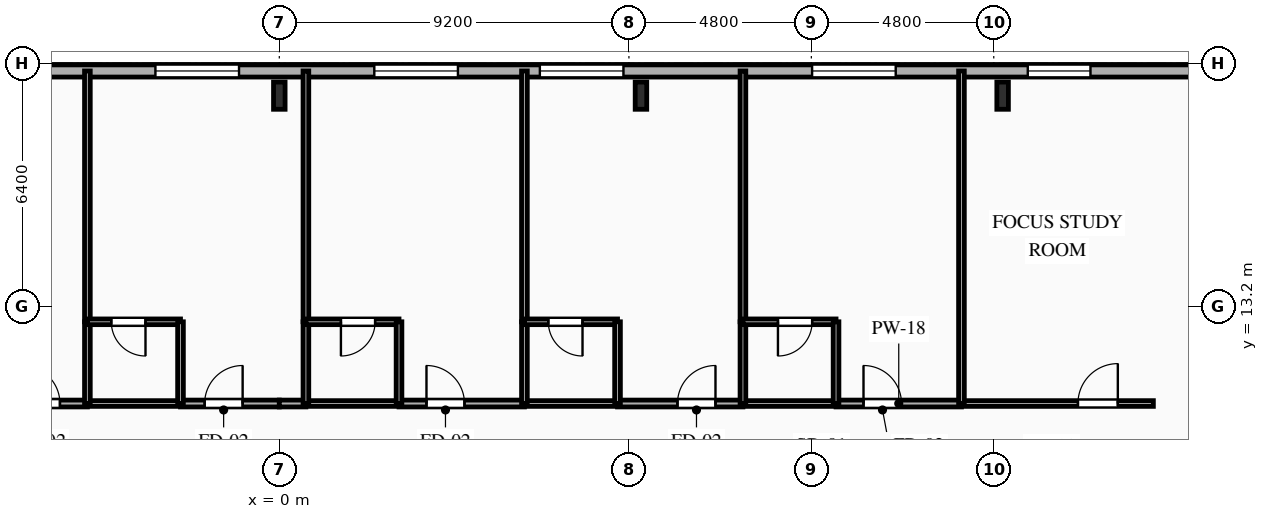
"""IFC4 building model, lengths in metres.
Left out: names, types, materials, properties, quantities, classifications, styles, units other than length and angle.
Written with IfcOpenShell. Run it as: python <this file> out.ifc"""

import sys

from ifc_helpers import new_model, si_unit, direction, frame, frame_2d, origin, origin_2d, place, context, subcontext, project, spatial, rectangle, i_section, extrude, element, fill, save


model = new_model("IFC4")
c1 = context("Model", 3, precision=1e-05, world=origin(), true_north=direction((0.0, 1.0)))
c2 = subcontext(c1, "Body", "Model", "MODEL_VIEW")
j1 = project(units=[si_unit("LENGTHUNIT", "METRE"), si_unit("PLANEANGLEUNIT", "RADIAN")], contexts=[c1])
p1 = place(None, origin())
s1 = spatial("IfcSite", under=j1, at=p1, CompositionType="ELEMENT")
p2 = place(p1, origin())
s2 = spatial("IfcBuilding", under=s1, at=p2, CompositionType="ELEMENT")
p3 = place(p2, frame((0.0, 0.0, 53.8)))
s3 = spatial("IfcBuildingStorey", under=s2, at=p3, CompositionType="ELEMENT", Elevation=53.8)
for number, where, z_axis, x_axis in (
    (1, (19.033, 18.75, 0.0), (0.0, 0.0, 1.0), (1.0, 0.0, 0.0)),
    (2, (9.517, 18.75, 0.0), (0.0, 0.0, 1.0), (1.0, 0.0, 0.0)),
    (3, (0.0, 18.75, 0.0), (0.0, 0.0, 1.0), (1.0, 0.0, 0.0)),
):
    element("IfcColumn", number, at=place(p3, frame(where, z_axis=z_axis, x_axis=x_axis)), inside=s3, PredefinedType="COLUMN", context=c2, shape_type="SweptSolid", body=[
        extrude(i_section(OverallWidth=0.304, OverallDepth=0.716, WebThickness=0.021, FlangeThickness=0.04, FilletRadius=0.027, at=origin_2d()), origin(), (0.0, 0.0, 1.0), 3.35),
    ])
p4 = place(p3, frame((-29.2, 19.4, 0.0), z_axis=(0.0, 0.0, 1.0), x_axis=(1.0, 0.0, 0.0)))
e4 = element("IfcWall", 4, at=p4, inside=s3, PredefinedType="SOLIDWALL", context=c2, shape_type="SweptSolid", body=[
    extrude(rectangle(XDim=58.4, YDim=0.32, at=frame_2d((29.2, 0.0))), origin(), (0.0, 0.0, 1.0), 3.035),
])
p5 = place(p4, frame((8.065, 0.0, 0.85)))
e5 = element("IfcOpeningElement", 5, at=p5, cuts=e4, PredefinedType="OPENING", context=c2, shape_type="SweptSolid", body=[
    extrude(rectangle(XDim=1.65, YDim=1.85, at=frame_2d((0.825, 0.925))), frame((0.0, 0.17, 0.0), z_axis=(0.0, -1.0, 0.0), x_axis=(1.0, 0.0, 0.0)), (0.0, 0.0, 1.0), 0.34),
])
p6 = place(p4, frame((15.97, 0.0, 0.85)))
e6 = element("IfcOpeningElement", 6, at=p6, cuts=e4, PredefinedType="OPENING", context=c2, shape_type="SweptSolid", body=[
    extrude(rectangle(XDim=1.5, YDim=1.85, at=frame_2d((0.75, 0.925))), frame((0.0, 0.17, 0.0), z_axis=(0.0, -1.0, 0.0), x_axis=(1.0, 0.0, 0.0)), (0.0, 0.0, 1.0), 0.34),
])
p7 = place(p4, frame((20.18, 0.0, 0.85)))
e7 = element("IfcOpeningElement", 7, at=p7, cuts=e4, PredefinedType="OPENING", context=c2, shape_type="SweptSolid", body=[
    extrude(rectangle(XDim=2.2, YDim=1.85, at=frame_2d((1.1, 0.925))), frame((0.0, 0.17, 0.0), z_axis=(0.0, -1.0, 0.0), x_axis=(1.0, 0.0, 0.0)), (0.0, 0.0, 1.0), 0.34),
])
p8 = place(p4, frame((25.94, 0.0, 0.85)))
e8 = element("IfcOpeningElement", 8, at=p8, cuts=e4, PredefinedType="OPENING", context=c2, shape_type="SweptSolid", body=[
    extrude(rectangle(XDim=2.2, YDim=1.85, at=frame_2d((1.1, 0.925))), frame((0.0, 0.17, 0.0), z_axis=(0.0, -1.0, 0.0), x_axis=(1.0, 0.0, 0.0)), (0.0, 0.0, 1.0), 0.34),
])
p9 = place(p4, frame((31.7, 0.0, 0.85)))
e9 = element("IfcOpeningElement", 9, at=p9, cuts=e4, PredefinedType="OPENING", context=c2, shape_type="SweptSolid", body=[
    extrude(rectangle(XDim=2.2, YDim=1.85, at=frame_2d((1.1, 0.925))), frame((0.0, 0.17, 0.0), z_axis=(0.0, -1.0, 0.0), x_axis=(1.0, 0.0, 0.0)), (0.0, 0.0, 1.0), 0.34),
])
p10 = place(p4, frame((36.056, 0.0, 0.85)))
e10 = element("IfcOpeningElement", 10, at=p10, cuts=e4, PredefinedType="OPENING", context=c2, shape_type="SweptSolid", body=[
    extrude(rectangle(XDim=2.2, YDim=1.85, at=frame_2d((1.1, 0.925))), frame((0.0, 0.17, 0.0), z_axis=(0.0, -1.0, 0.0), x_axis=(1.0, 0.0, 0.0)), (0.0, 0.0, 1.0), 0.34),
])
p11 = place(p4, frame((43.22, 0.0, 0.85)))
e11 = element("IfcOpeningElement", 11, at=p11, cuts=e4, PredefinedType="OPENING", context=c2, shape_type="SweptSolid", body=[
    extrude(rectangle(XDim=2.2, YDim=1.85, at=frame_2d((1.1, 0.925))), frame((0.0, 0.17, 0.0), z_axis=(0.0, -1.0, 0.0), x_axis=(1.0, 0.0, 0.0)), (0.0, 0.0, 1.0), 0.34),
])
p12 = place(p4, frame((48.895, 0.0, 0.85)))
e12 = element("IfcOpeningElement", 12, at=p12, cuts=e4, PredefinedType="OPENING", context=c2, shape_type="SweptSolid", body=[
    extrude(rectangle(XDim=1.65, YDim=1.85, at=frame_2d((0.825, 0.925))), frame((0.0, 0.17, 0.0), z_axis=(0.0, -1.0, 0.0), x_axis=(1.0, 0.0, 0.0)), (0.0, 0.0, 1.0), 0.34),
])
p13 = place(p3, frame((-8.35, 10.65, 0.0), z_axis=(0.0, 0.0, 1.0), x_axis=(1.0, 0.0, 0.0)))
e13 = element("IfcWall", 13, at=p13, inside=s3, PredefinedType="PARTITIONING", context=c2, shape_type="SweptSolid", body=[
    extrude(rectangle(XDim=3.3, YDim=0.18, at=frame_2d((1.65, 0.0))), origin(), (0.0, 0.0, 1.0), 3.035),
])
p14 = place(p13, frame((1.577, 0.0, 0.0)))
e14 = element("IfcOpeningElement", 14, at=p14, cuts=e13, PredefinedType="OPENING", context=c2, shape_type="SweptSolid", body=[
    extrude(rectangle(XDim=1.0, YDim=2.15, at=frame_2d((0.5, 1.075))), frame((0.0, 0.1, 0.0), z_axis=(0.0, -1.0, 0.0), x_axis=(1.0, 0.0, 0.0)), (0.0, 0.0, 1.0), 0.2),
])
p15 = place(p3, frame((-2.6, 10.65, 0.0), z_axis=(0.0, 0.0, 1.0), x_axis=(1.0, 0.0, 0.0)))
e15 = element("IfcWall", 15, at=p15, inside=s3, PredefinedType="PARTITIONING", context=c2, shape_type="SweptSolid", body=[
    extrude(rectangle(XDim=2.6, YDim=0.18, at=frame_2d((1.3, 0.0))), origin(), (0.0, 0.0, 1.0), 3.035),
])
p16 = place(p15, frame((0.635, 0.0, 0.0)))
e16 = element("IfcOpeningElement", 16, at=p16, cuts=e15, PredefinedType="OPENING", context=c2, shape_type="SweptSolid", body=[
    extrude(rectangle(XDim=1.0, YDim=2.15, at=frame_2d((0.5, 1.075))), frame((0.0, 0.1, 0.0), z_axis=(0.0, -1.0, 0.0), x_axis=(1.0, 0.0, 0.0)), (0.0, 0.0, 1.0), 0.2),
])
p17 = place(p3, frame((-5.05, 10.65, 0.0), z_axis=(0.0, 0.0, 1.0), x_axis=(1.0, 0.0, 0.0)))
e17 = element("IfcWall", 17, at=p17, inside=s3, PredefinedType="PLUMBINGWALL", context=c2, shape_type="SweptSolid", body=[
    extrude(rectangle(XDim=2.45, YDim=0.15, at=frame_2d((1.225, 0.0))), origin(), (0.0, 0.0, 1.0), 3.035),
])
p18 = place(p3, frame((0.0, 10.65, 0.0), z_axis=(0.0, 0.0, 1.0), x_axis=(1.0, 0.0, 0.0)))
e18 = element("IfcWall", 18, at=p18, inside=s3, PredefinedType="PARTITIONING", context=c2, shape_type="SweptSolid", body=[
    extrude(rectangle(XDim=0.7, YDim=0.18, at=frame_2d((0.35, 0.0))), origin(), (0.0, 0.0, 1.0), 3.035),
])
p19 = place(p3, frame((3.15, 10.65, 0.0), z_axis=(0.0, 0.0, 1.0), x_axis=(1.0, 0.0, 0.0)))
e19 = element("IfcWall", 19, at=p19, inside=s3, PredefinedType="PARTITIONING", context=c2, shape_type="SweptSolid", body=[
    extrude(rectangle(XDim=3.3, YDim=0.18, at=frame_2d((1.65, 0.0))), origin(), (0.0, 0.0, 1.0), 3.035),
])
p20 = place(p19, frame((0.722, 0.0, 0.0)))
e20 = element("IfcOpeningElement", 20, at=p20, cuts=e19, PredefinedType="OPENING", context=c2, shape_type="SweptSolid", body=[
    extrude(rectangle(XDim=1.0, YDim=2.15, at=frame_2d((0.5, 1.075))), frame((0.0, 0.1, 0.0), z_axis=(0.0, -1.0, 0.0), x_axis=(1.0, 0.0, 0.0)), (0.0, 0.0, 1.0), 0.2),
])
p21 = place(p3, frame((0.7, 10.65, 0.0), z_axis=(0.0, 0.0, 1.0), x_axis=(1.0, 0.0, 0.0)))
e21 = element("IfcWall", 21, at=p21, inside=s3, PredefinedType="PLUMBINGWALL", context=c2, shape_type="SweptSolid", body=[
    extrude(rectangle(XDim=2.45, YDim=0.15, at=frame_2d((1.225, 0.0))), origin(), (0.0, 0.0, 1.0), 3.035),
])
p22 = place(p3, frame((8.9, 10.65, 0.0), z_axis=(0.0, 0.0, 1.0), x_axis=(1.0, 0.0, 0.0)))
e22 = element("IfcWall", 22, at=p22, inside=s3, PredefinedType="PARTITIONING", context=c2, shape_type="SweptSolid", body=[
    extrude(rectangle(XDim=3.3, YDim=0.18, at=frame_2d((1.65, 0.0))), origin(), (0.0, 0.0, 1.0), 3.035),
])
p23 = place(p22, frame((1.577, 0.0, 0.0)))
e23 = element("IfcOpeningElement", 23, at=p23, cuts=e22, PredefinedType="OPENING", context=c2, shape_type="SweptSolid", body=[
    extrude(rectangle(XDim=1.0, YDim=2.15, at=frame_2d((0.5, 1.075))), frame((0.0, 0.1, 0.0), z_axis=(0.0, -1.0, 0.0), x_axis=(1.0, 0.0, 0.0)), (0.0, 0.0, 1.0), 0.2),
])
p24 = place(p3, frame((6.45, 10.65, 0.0), z_axis=(0.0, 0.0, 1.0), x_axis=(1.0, 0.0, 0.0)))
e24 = element("IfcWall", 24, at=p24, inside=s3, PredefinedType="PLUMBINGWALL", context=c2, shape_type="SweptSolid", body=[
    extrude(rectangle(XDim=2.45, YDim=0.15, at=frame_2d((1.225, 0.0))), origin(), (0.0, 0.0, 1.0), 3.035),
])
p25 = place(p3, frame((14.65, 10.65, 0.0), z_axis=(0.0, 0.0, 1.0), x_axis=(1.0, 0.0, 0.0)))
e25 = element("IfcWall", 25, at=p25, inside=s3, PredefinedType="PARTITIONING", context=c2, shape_type="SweptSolid", body=[
    extrude(rectangle(XDim=3.3, YDim=0.18, at=frame_2d((1.65, 0.0))), origin(), (0.0, 0.0, 1.0), 3.035),
])
p26 = place(p25, frame((0.722, 0.0, 0.0)))
e26 = element("IfcOpeningElement", 26, at=p26, cuts=e25, PredefinedType="OPENING", context=c2, shape_type="SweptSolid", body=[
    extrude(rectangle(XDim=1.0, YDim=2.15, at=frame_2d((0.5, 1.075))), frame((0.0, 0.1, 0.0), z_axis=(0.0, -1.0, 0.0), x_axis=(1.0, 0.0, 0.0)), (0.0, 0.0, 1.0), 0.2),
])
p27 = place(p3, frame((12.2, 10.65, 0.0), z_axis=(0.0, 0.0, 1.0), x_axis=(1.0, 0.0, 0.0)))
e27 = element("IfcWall", 27, at=p27, inside=s3, PredefinedType="PLUMBINGWALL", context=c2, shape_type="SweptSolid", body=[
    extrude(rectangle(XDim=2.45, YDim=0.15, at=frame_2d((1.225, 0.0))), origin(), (0.0, 0.0, 1.0), 3.035),
])
p28 = place(p3, frame((17.95, 10.65, 0.0), z_axis=(0.0, 0.0, 1.0), x_axis=(1.0, 0.0, 0.0)))
e28 = element("IfcWall", 28, at=p28, inside=s3, PredefinedType="PARTITIONING", context=c2, shape_type="SweptSolid", body=[
    extrude(rectangle(XDim=5.05, YDim=0.15, at=frame_2d((2.525, 0.0))), origin(), (0.0, 0.0, 1.0), 3.035),
])
p29 = place(p28, frame((3.065, 0.0, 0.0)))
e29 = element("IfcOpeningElement", 29, at=p29, cuts=e28, PredefinedType="OPENING", context=c2, shape_type="SweptSolid", body=[
    extrude(rectangle(XDim=1.05, YDim=2.15, at=frame_2d((0.525, 1.075))), frame((0.0, 0.085, 0.0), z_axis=(0.0, -1.0, 0.0), x_axis=(1.0, 0.0, 0.0)), (0.0, 0.0, 1.0), 0.17),
])
p30 = place(p3, frame((-5.05, 19.4, 0.0), z_axis=(0.0, 0.0, 1.0), x_axis=(0.0, -1.0, 0.0)))
e30 = element("IfcWall", 30, at=p30, inside=s3, PredefinedType="PARTITIONING", context=c2, shape_type="SweptSolid", body=[
    extrude(rectangle(XDim=6.6, YDim=0.15, at=frame_2d((3.3, 0.0))), origin(), (0.0, 0.0, 1.0), 3.035),
])
p31 = place(p3, frame((-5.05, 12.8, 0.0), z_axis=(0.0, 0.0, 1.0), x_axis=(0.0, -1.0, 0.0)))
e31 = element("IfcWall", 31, at=p31, inside=s3, PredefinedType="PLUMBINGWALL", context=c2, shape_type="SweptSolid", body=[
    extrude(rectangle(XDim=2.15, YDim=0.15, at=frame_2d((1.075, 0.0))), origin(), (0.0, 0.0, 1.0), 3.035),
])
p32 = place(p3, frame((-2.6, 12.8, 0.0), z_axis=(0.0, 0.0, 1.0), x_axis=(-1.0, 0.0, 0.0)))
e32 = element("IfcWall", 32, at=p32, inside=s3, PredefinedType="PLUMBINGWALL", context=c2, shape_type="SweptSolid", body=[
    extrude(rectangle(XDim=2.45, YDim=0.15, at=frame_2d((1.225, 0.0))), origin(), (0.0, 0.0, 1.0), 3.035),
])
p33 = place(p32, frame((0.921, 0.0, 0.0)))
e33 = element("IfcOpeningElement", 33, at=p33, cuts=e32, PredefinedType="OPENING", context=c2, shape_type="SweptSolid", body=[
    extrude(rectangle(XDim=0.9, YDim=2.1, at=frame_2d((0.45, 1.05))), frame((0.0, 0.085, 0.0), z_axis=(0.0, -1.0, 0.0), x_axis=(1.0, 0.0, 0.0)), (0.0, 0.0, 1.0), 0.17),
])
p34 = place(p3, frame((-2.6, 10.65, 0.0), z_axis=(0.0, 0.0, 1.0), x_axis=(0.0, 1.0, 0.0)))
e34 = element("IfcWall", 34, at=p34, inside=s3, PredefinedType="PLUMBINGWALL", context=c2, shape_type="SweptSolid", body=[
    extrude(rectangle(XDim=2.15, YDim=0.15, at=frame_2d((1.075, 0.0))), origin(), (0.0, 0.0, 1.0), 3.035),
])
p35 = place(p3, frame((0.7, 19.4, 0.0), z_axis=(0.0, 0.0, 1.0), x_axis=(0.0, -1.0, 0.0)))
e35 = element("IfcWall", 35, at=p35, inside=s3, PredefinedType="PARTITIONING", context=c2, shape_type="SweptSolid", body=[
    extrude(rectangle(XDim=6.6, YDim=0.15, at=frame_2d((3.3, 0.0))), origin(), (0.0, 0.0, 1.0), 3.035),
])
p36 = place(p3, frame((0.7, 12.8, 0.0), z_axis=(0.0, 0.0, 1.0), x_axis=(0.0, -1.0, 0.0)))
e36 = element("IfcWall", 36, at=p36, inside=s3, PredefinedType="PLUMBINGWALL", context=c2, shape_type="SweptSolid", body=[
    extrude(rectangle(XDim=2.15, YDim=0.15, at=frame_2d((1.075, 0.0))), origin(), (0.0, 0.0, 1.0), 3.035),
])
p37 = place(p3, frame((3.15, 12.8, 0.0), z_axis=(0.0, 0.0, 1.0), x_axis=(-1.0, 0.0, 0.0)))
e37 = element("IfcWall", 37, at=p37, inside=s3, PredefinedType="PLUMBINGWALL", context=c2, shape_type="SweptSolid", body=[
    extrude(rectangle(XDim=2.45, YDim=0.15, at=frame_2d((1.225, 0.0))), origin(), (0.0, 0.0, 1.0), 3.035),
])
p38 = place(p37, frame((0.629, 0.0, 0.0)))
e38 = element("IfcOpeningElement", 38, at=p38, cuts=e37, PredefinedType="OPENING", context=c2, shape_type="SweptSolid", body=[
    extrude(rectangle(XDim=0.9, YDim=2.1, at=frame_2d((0.45, 1.05))), frame((0.0, 0.085, 0.0), z_axis=(0.0, -1.0, 0.0), x_axis=(1.0, 0.0, 0.0)), (0.0, 0.0, 1.0), 0.17),
])
p39 = place(p3, frame((3.15, 10.65, 0.0), z_axis=(0.0, 0.0, 1.0), x_axis=(0.0, 1.0, 0.0)))
e39 = element("IfcWall", 39, at=p39, inside=s3, PredefinedType="PLUMBINGWALL", context=c2, shape_type="SweptSolid", body=[
    extrude(rectangle(XDim=2.15, YDim=0.15, at=frame_2d((1.075, 0.0))), origin(), (0.0, 0.0, 1.0), 3.035),
])
p40 = place(p3, frame((6.45, 19.4, 0.0), z_axis=(0.0, 0.0, 1.0), x_axis=(0.0, -1.0, 0.0)))
e40 = element("IfcWall", 40, at=p40, inside=s3, PredefinedType="PARTITIONING", context=c2, shape_type="SweptSolid", body=[
    extrude(rectangle(XDim=6.6, YDim=0.15, at=frame_2d((3.3, 0.0))), origin(), (0.0, 0.0, 1.0), 3.035),
])
p41 = place(p3, frame((6.45, 12.8, 0.0), z_axis=(0.0, 0.0, 1.0), x_axis=(0.0, -1.0, 0.0)))
e41 = element("IfcWall", 41, at=p41, inside=s3, PredefinedType="PLUMBINGWALL", context=c2, shape_type="SweptSolid", body=[
    extrude(rectangle(XDim=2.15, YDim=0.15, at=frame_2d((1.075, 0.0))), origin(), (0.0, 0.0, 1.0), 3.035),
])
p42 = place(p3, frame((8.9, 12.8, 0.0), z_axis=(0.0, 0.0, 1.0), x_axis=(-1.0, 0.0, 0.0)))
e42 = element("IfcWall", 42, at=p42, inside=s3, PredefinedType="PLUMBINGWALL", context=c2, shape_type="SweptSolid", body=[
    extrude(rectangle(XDim=2.45, YDim=0.15, at=frame_2d((1.225, 0.0))), origin(), (0.0, 0.0, 1.0), 3.035),
])
p43 = place(p42, frame((0.921, 0.0, 0.0)))
e43 = element("IfcOpeningElement", 43, at=p43, cuts=e42, PredefinedType="OPENING", context=c2, shape_type="SweptSolid", body=[
    extrude(rectangle(XDim=0.9, YDim=2.1, at=frame_2d((0.45, 1.05))), frame((0.0, 0.085, 0.0), z_axis=(0.0, -1.0, 0.0), x_axis=(1.0, 0.0, 0.0)), (0.0, 0.0, 1.0), 0.17),
])
p44 = place(p3, frame((8.9, 10.65, 0.0), z_axis=(0.0, 0.0, 1.0), x_axis=(0.0, 1.0, 0.0)))
e44 = element("IfcWall", 44, at=p44, inside=s3, PredefinedType="PLUMBINGWALL", context=c2, shape_type="SweptSolid", body=[
    extrude(rectangle(XDim=2.15, YDim=0.15, at=frame_2d((1.075, 0.0))), origin(), (0.0, 0.0, 1.0), 3.035),
])
p45 = place(p3, frame((12.2, 19.4, 0.0), z_axis=(0.0, 0.0, 1.0), x_axis=(0.0, -1.0, 0.0)))
e45 = element("IfcWall", 45, at=p45, inside=s3, PredefinedType="PARTITIONING", context=c2, shape_type="SweptSolid", body=[
    extrude(rectangle(XDim=6.6, YDim=0.15, at=frame_2d((3.3, 0.0))), origin(), (0.0, 0.0, 1.0), 3.035),
])
p46 = place(p3, frame((12.2, 12.8, 0.0), z_axis=(0.0, 0.0, 1.0), x_axis=(0.0, -1.0, 0.0)))
e46 = element("IfcWall", 46, at=p46, inside=s3, PredefinedType="PLUMBINGWALL", context=c2, shape_type="SweptSolid", body=[
    extrude(rectangle(XDim=2.15, YDim=0.15, at=frame_2d((1.075, 0.0))), origin(), (0.0, 0.0, 1.0), 3.035),
])
p47 = place(p3, frame((14.65, 12.8, 0.0), z_axis=(0.0, 0.0, 1.0), x_axis=(-1.0, 0.0, 0.0)))
e47 = element("IfcWall", 47, at=p47, inside=s3, PredefinedType="PLUMBINGWALL", context=c2, shape_type="SweptSolid", body=[
    extrude(rectangle(XDim=2.45, YDim=0.15, at=frame_2d((1.225, 0.0))), origin(), (0.0, 0.0, 1.0), 3.035),
])
p48 = place(p47, frame((0.629, 0.0, 0.0)))
e48 = element("IfcOpeningElement", 48, at=p48, cuts=e47, PredefinedType="OPENING", context=c2, shape_type="SweptSolid", body=[
    extrude(rectangle(XDim=0.9, YDim=2.1, at=frame_2d((0.45, 1.05))), frame((0.0, 0.085, 0.0), z_axis=(0.0, -1.0, 0.0), x_axis=(1.0, 0.0, 0.0)), (0.0, 0.0, 1.0), 0.17),
])
p49 = place(p3, frame((14.65, 10.65, 0.0), z_axis=(0.0, 0.0, 1.0), x_axis=(0.0, 1.0, 0.0)))
e49 = element("IfcWall", 49, at=p49, inside=s3, PredefinedType="PLUMBINGWALL", context=c2, shape_type="SweptSolid", body=[
    extrude(rectangle(XDim=2.15, YDim=0.15, at=frame_2d((1.075, 0.0))), origin(), (0.0, 0.0, 1.0), 3.035),
])
p50 = place(p3, frame((17.95, 19.4, 0.0), z_axis=(0.0, 0.0, 1.0), x_axis=(0.0, -1.0, 0.0)))
e50 = element("IfcWall", 50, at=p50, inside=s3, PredefinedType="PARTITIONING", context=c2, shape_type="SweptSolid", body=[
    extrude(rectangle(XDim=8.75, YDim=0.15, at=frame_2d((4.375, 0.0))), origin(), (0.0, 0.0, 1.0), 3.035),
])
p51 = place(p8, origin())
e51 = element("IfcWindow", 51, at=p51, inside=s3, PartitioningType="SINGLE_PANEL", PredefinedType="WINDOW", context=c2, shape_type="SweptSolid", body=[
    extrude(rectangle(XDim=2.2, YDim=1.85, at=frame_2d((1.1, 0.925))), frame((0.0, 0.03, 0.0), z_axis=(0.0, -1.0, 0.0), x_axis=(1.0, 0.0, 0.0)), (0.0, 0.0, 1.0), 0.06),
])
fill(e8, e51)
p52 = place(p9, origin())
e52 = element("IfcWindow", 52, at=p52, inside=s3, PartitioningType="SINGLE_PANEL", PredefinedType="WINDOW", context=c2, shape_type="SweptSolid", body=[
    extrude(rectangle(XDim=2.2, YDim=1.85, at=frame_2d((1.1, 0.925))), frame((0.0, 0.03, 0.0), z_axis=(0.0, -1.0, 0.0), x_axis=(1.0, 0.0, 0.0)), (0.0, 0.0, 1.0), 0.06),
])
fill(e9, e52)
p53 = place(p10, origin())
e53 = element("IfcWindow", 53, at=p53, inside=s3, PartitioningType="SINGLE_PANEL", PredefinedType="WINDOW", context=c2, shape_type="SweptSolid", body=[
    extrude(rectangle(XDim=2.2, YDim=1.85, at=frame_2d((1.1, 0.925))), frame((0.0, 0.03, 0.0), z_axis=(0.0, -1.0, 0.0), x_axis=(1.0, 0.0, 0.0)), (0.0, 0.0, 1.0), 0.06),
])
fill(e10, e53)
p54 = place(p11, origin())
e54 = element("IfcWindow", 54, at=p54, inside=s3, PartitioningType="SINGLE_PANEL", PredefinedType="WINDOW", context=c2, shape_type="SweptSolid", body=[
    extrude(rectangle(XDim=2.2, YDim=1.85, at=frame_2d((1.1, 0.925))), frame((0.0, 0.03, 0.0), z_axis=(0.0, -1.0, 0.0), x_axis=(1.0, 0.0, 0.0)), (0.0, 0.0, 1.0), 0.06),
])
fill(e11, e54)
p55 = place(p12, origin())
e55 = element("IfcWindow", 55, at=p55, inside=s3, PartitioningType="SINGLE_PANEL", PredefinedType="WINDOW", context=c2, shape_type="SweptSolid", body=[
    extrude(rectangle(XDim=1.65, YDim=1.85, at=frame_2d((0.825, 0.925))), frame((0.0, 0.03, 0.0), z_axis=(0.0, -1.0, 0.0), x_axis=(1.0, 0.0, 0.0)), (0.0, 0.0, 1.0), 0.06),
])
fill(e12, e55)
p56 = place(p14, origin())
e56 = element("IfcDoor", 56, at=p56, inside=s3, OperationType="SINGLE_SWING_LEFT", PredefinedType="DOOR", context=c2, shape_type="SweptSolid", body=[
    extrude(rectangle(XDim=1.0, YDim=2.15, at=frame_2d((0.5, 1.075))), frame((0.0, 0.025, 0.0), z_axis=(0.0, -1.0, 0.0), x_axis=(1.0, 0.0, 0.0)), (0.0, 0.0, 1.0), 0.05),
])
fill(e14, e56)
p57 = place(p16, origin())
e57 = element("IfcDoor", 57, at=p57, inside=s3, OperationType="SINGLE_SWING_RIGHT", PredefinedType="DOOR", context=c2, shape_type="SweptSolid", body=[
    extrude(rectangle(XDim=1.0, YDim=2.15, at=frame_2d((0.5, 1.075))), frame((0.0, 0.025, 0.0), z_axis=(0.0, -1.0, 0.0), x_axis=(1.0, 0.0, 0.0)), (0.0, 0.0, 1.0), 0.05),
])
fill(e16, e57)
p58 = place(p20, origin())
e58 = element("IfcDoor", 58, at=p58, inside=s3, OperationType="SINGLE_SWING_LEFT", PredefinedType="DOOR", context=c2, shape_type="SweptSolid", body=[
    extrude(rectangle(XDim=1.0, YDim=2.15, at=frame_2d((0.5, 1.075))), frame((0.0, 0.025, 0.0), z_axis=(0.0, -1.0, 0.0), x_axis=(1.0, 0.0, 0.0)), (0.0, 0.0, 1.0), 0.05),
])
fill(e20, e58)
p59 = place(p23, origin())
e59 = element("IfcDoor", 59, at=p59, inside=s3, OperationType="SINGLE_SWING_RIGHT", PredefinedType="DOOR", context=c2, shape_type="SweptSolid", body=[
    extrude(rectangle(XDim=1.0, YDim=2.15, at=frame_2d((0.5, 1.075))), frame((0.0, 0.025, 0.0), z_axis=(0.0, -1.0, 0.0), x_axis=(1.0, 0.0, 0.0)), (0.0, 0.0, 1.0), 0.05),
])
fill(e23, e59)
p60 = place(p26, origin())
e60 = element("IfcDoor", 60, at=p60, inside=s3, OperationType="SINGLE_SWING_LEFT", PredefinedType="DOOR", context=c2, shape_type="SweptSolid", body=[
    extrude(rectangle(XDim=1.0, YDim=2.15, at=frame_2d((0.5, 1.075))), frame((0.0, 0.025, 0.0), z_axis=(0.0, -1.0, 0.0), x_axis=(1.0, 0.0, 0.0)), (0.0, 0.0, 1.0), 0.05),
])
fill(e26, e60)
p61 = place(p29, origin())
e61 = element("IfcDoor", 61, at=p61, inside=s3, OperationType="SINGLE_SWING_RIGHT", PredefinedType="DOOR", context=c2, shape_type="SweptSolid", body=[
    extrude(rectangle(XDim=1.05, YDim=2.15, at=frame_2d((0.525, 1.075))), frame((0.0, 0.025, 0.0), z_axis=(0.0, -1.0, 0.0), x_axis=(1.0, 0.0, 0.0)), (0.0, 0.0, 1.0), 0.05),
])
fill(e29, e61)
p62 = place(p33, origin())
e62 = element("IfcDoor", 62, at=p62, inside=s3, OperationType="SINGLE_SWING_LEFT", PredefinedType="DOOR", context=c2, shape_type="SweptSolid", body=[
    extrude(rectangle(XDim=0.9, YDim=2.1, at=frame_2d((0.45, 1.05))), frame((0.0, 0.025, 0.0), z_axis=(0.0, -1.0, 0.0), x_axis=(1.0, 0.0, 0.0)), (0.0, 0.0, 1.0), 0.05),
])
fill(e33, e62)
p63 = place(p38, origin())
e63 = element("IfcDoor", 63, at=p63, inside=s3, OperationType="SINGLE_SWING_RIGHT", PredefinedType="DOOR", context=c2, shape_type="SweptSolid", body=[
    extrude(rectangle(XDim=0.9, YDim=2.1, at=frame_2d((0.45, 1.05))), frame((0.0, 0.025, 0.0), z_axis=(0.0, -1.0, 0.0), x_axis=(1.0, 0.0, 0.0)), (0.0, 0.0, 1.0), 0.05),
])
fill(e38, e63)
p64 = place(p43, origin())
e64 = element("IfcDoor", 64, at=p64, inside=s3, OperationType="SINGLE_SWING_LEFT", PredefinedType="DOOR", context=c2, shape_type="SweptSolid", body=[
    extrude(rectangle(XDim=0.9, YDim=2.1, at=frame_2d((0.45, 1.05))), frame((0.0, 0.025, 0.0), z_axis=(0.0, -1.0, 0.0), x_axis=(1.0, 0.0, 0.0)), (0.0, 0.0, 1.0), 0.05),
])
fill(e43, e64)
p65 = place(p48, origin())
e65 = element("IfcDoor", 65, at=p65, inside=s3, OperationType="SINGLE_SWING_RIGHT", PredefinedType="DOOR", context=c2, shape_type="SweptSolid", body=[
    extrude(rectangle(XDim=0.9, YDim=2.1, at=frame_2d((0.45, 1.05))), frame((0.0, 0.025, 0.0), z_axis=(0.0, -1.0, 0.0), x_axis=(1.0, 0.0, 0.0)), (0.0, 0.0, 1.0), 0.05),
])
fill(e48, e65)
save(model, sys.argv[1])
